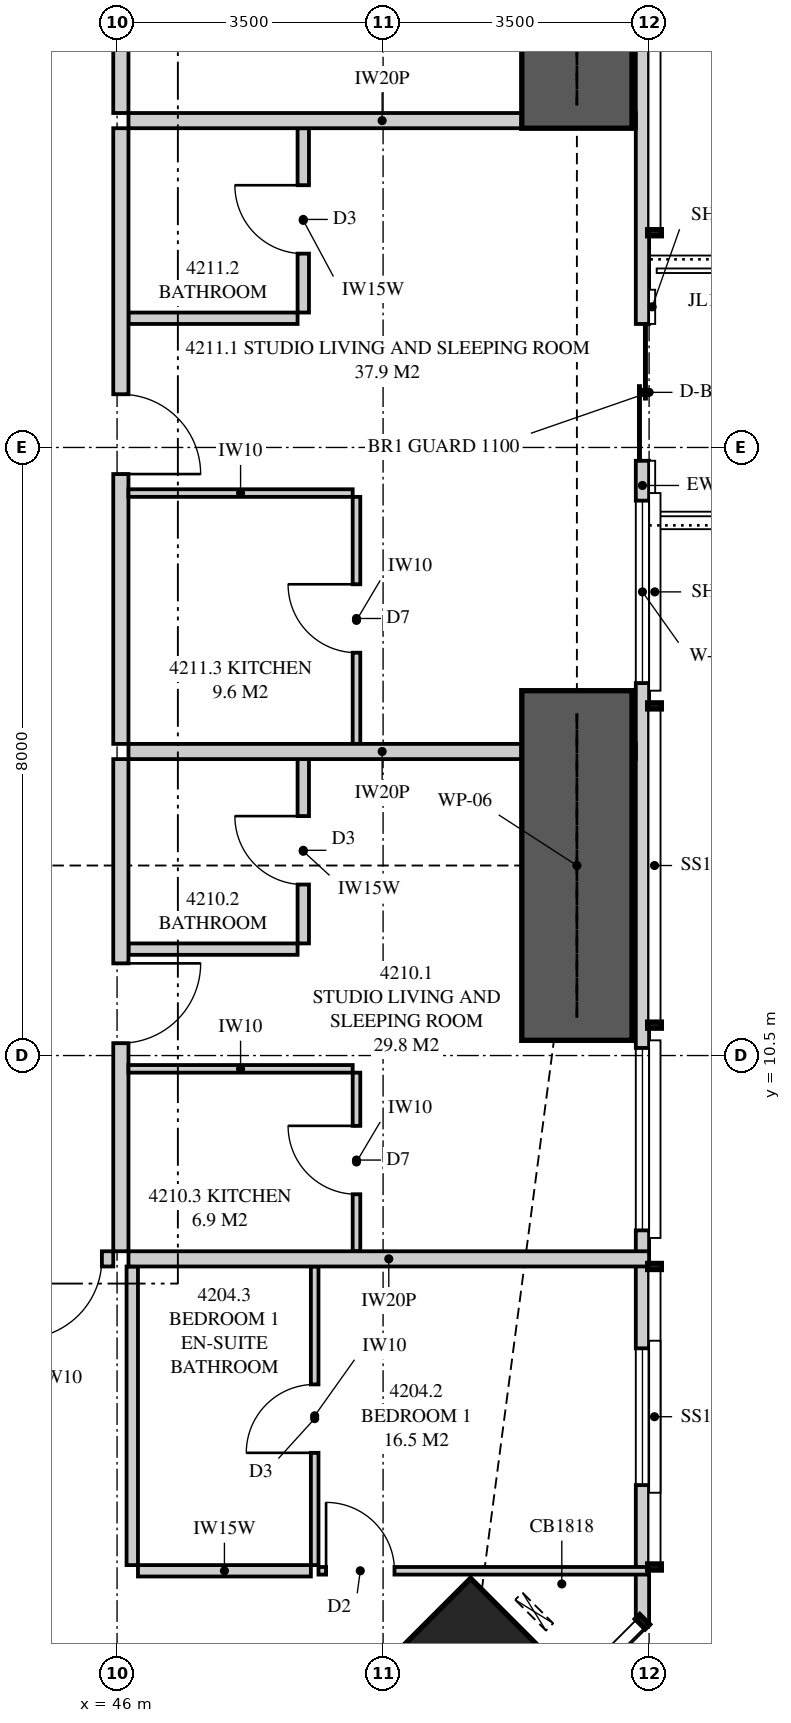
"""IFC4 building model, lengths in metres.
Left out: names, types, materials, properties, quantities, classifications, styles, units other than length and angle.
Written with IfcOpenShell. Run it as: python <this file> out.ifc"""

import sys

from ifc_helpers import new_model, si_unit, direction, frame, frame_2d, origin, origin_2d, place, context, subcontext, project, spatial, polyline, rectangle, hollow_rectangle, outline, extrude, element, fill, save


model = new_model("IFC4")
c1 = context("Model", 3, precision=1e-05, world=origin(), true_north=direction((0.0, 1.0)))
c2 = subcontext(c1, "Body", "Model", "MODEL_VIEW")
j1 = project(units=[si_unit("LENGTHUNIT", "METRE"), si_unit("PLANEANGLEUNIT", "RADIAN")], contexts=[c1])
p1 = place(None, origin())
s1 = spatial("IfcSite", under=j1, at=p1, CompositionType="ELEMENT")
p2 = place(p1, origin())
s2 = spatial("IfcBuilding", under=s1, at=p2, CompositionType="ELEMENT")
p3 = place(p2, frame((0.0, 0.0, 157.7)))
s3 = spatial("IfcBuildingStorey", under=s2, at=p3, CompositionType="ELEMENT", Elevation=157.7)
p4 = place(p3, frame((50.652, 2.348, 0.0), z_axis=(0.0, 0.0, 1.0), x_axis=(-0.707106781187, 0.707106781187, 0.0)))
e1 = element("IfcColumn", 1, at=p4, inside=s3, PredefinedType="COLUMN", context=c2, shape_type="SweptSolid", body=[
    extrude(hollow_rectangle(XDim=1.8, YDim=1.8, WallThickness=0.125, at=origin_2d()), origin(), (0.0, 0.0, 1.0), 3.35),
])
p5 = place(p3, frame((52.913, 3.051, 0.0), z_axis=(0.0, 0.0, 1.0), x_axis=(0.0, 1.0, 0.0)))
e2 = element("IfcWall", 2, at=p5, inside=s3, PredefinedType="SOLIDWALL", context=c2, shape_type="SweptSolid", body=[
    extrude(outline(polyline([(0.0, 0.0), (29.897, 0.0), (29.897, 3.11), (22.167, 3.11), (22.167, 2.15), (22.074, 2.15), (22.074, 3.11), (21.949, 3.11), (21.949, 2.15), (9.949, 2.15), (9.949, 3.11), (9.847, 3.11), (9.847, 2.15), (9.706, 2.15), (9.706, 3.11), (0.0, 3.11), (0.0, 0.0)])), frame((0.0, 0.087, 0.0), z_axis=(0.0, -1.0, 0.0), x_axis=(1.0, 0.0, 0.0)), (0.0, 0.0, 1.0), 0.175),
])
p6 = place(p5, frame((1.797, 0.0, 0.4)))
e3 = element("IfcOpeningElement", 3, at=p6, cuts=e2, PredefinedType="OPENING", context=c2, shape_type="SweptSolid", body=[
    extrude(rectangle(XDim=1.8, YDim=1.7, at=frame_2d((0.9, 0.85))), frame((0.0, 0.097, 0.0), z_axis=(0.0, -1.0, 0.0), x_axis=(1.0, 0.0, 0.0)), (0.0, 0.0, 1.0), 0.195),
])
p7 = place(p5, frame((5.149, 0.0, 0.4)))
e4 = element("IfcOpeningElement", 4, at=p7, cuts=e2, PredefinedType="OPENING", context=c2, shape_type="SweptSolid", body=[
    extrude(rectangle(XDim=2.4, YDim=1.7, at=frame_2d((1.2, 0.85))), frame((0.0, 0.097, 0.0), z_axis=(0.0, -1.0, 0.0), x_axis=(1.0, 0.0, 0.0)), (0.0, 0.0, 1.0), 0.195),
])
p8 = place(p5, frame((15.274, 0.0, 0.0)))
e5 = element("IfcOpeningElement", 5, at=p8, cuts=e2, PredefinedType="OPENING", context=c2, shape_type="SweptSolid", body=[
    extrude(rectangle(XDim=1.8, YDim=2.1, at=frame_2d((0.9, 1.05))), frame((0.0, 0.097, 0.0), z_axis=(0.0, -1.0, 0.0), x_axis=(1.0, 0.0, 0.0)), (0.0, 0.0, 1.0), 0.195),
])
p9 = place(p5, frame((12.349, 0.0, 0.4)))
e6 = element("IfcOpeningElement", 6, at=p9, cuts=e2, PredefinedType="OPENING", context=c2, shape_type="SweptSolid", body=[
    extrude(rectangle(XDim=2.4, YDim=1.7, at=frame_2d((1.2, 0.85))), frame((0.0, 0.097, 0.0), z_axis=(0.0, -1.0, 0.0), x_axis=(1.0, 0.0, 0.0)), (0.0, 0.0, 1.0), 0.195),
])
p10 = place(p5, frame((24.373, 0.0, 0.4)))
e7 = element("IfcOpeningElement", 7, at=p10, cuts=e2, PredefinedType="OPENING", context=c2, shape_type="SweptSolid", body=[
    extrude(rectangle(XDim=1.2, YDim=1.7, at=frame_2d((0.6, 0.85))), frame((0.0, 0.097, 0.0), z_axis=(0.0, -1.0, 0.0), x_axis=(1.0, 0.0, 0.0)), (0.0, 0.0, 1.0), 0.195),
])
p11 = place(p5, frame((26.801, 0.0, 0.4)))
e8 = element("IfcOpeningElement", 8, at=p11, cuts=e2, PredefinedType="OPENING", context=c2, shape_type="SweptSolid", body=[
    extrude(rectangle(XDim=1.8, YDim=1.7, at=frame_2d((0.9, 0.85))), frame((0.0, 0.097, 0.0), z_axis=(0.0, -1.0, 0.0), x_axis=(1.0, 0.0, 0.0)), (0.0, 0.0, 1.0), 0.195),
])
p12 = place(p3, frame((41.2, 7.825, 0.0), z_axis=(0.0, 0.0, 1.0), x_axis=(1.0, 0.0, 0.0)))
e9 = element("IfcWall", 9, at=p12, inside=s3, PredefinedType="PARTITIONING", context=c2, shape_type="SweptSolid", body=[
    extrude(outline(polyline([(0.0, 0.0), (4.75, 0.0), (4.75, 3.11), (1.896, 3.11), (1.896, 2.531), (1.204, 2.531), (1.204, 3.11), (0.0, 3.11), (0.0, 0.0)])), frame((0.0, 0.1, 0.0), z_axis=(0.0, -1.0, 0.0), x_axis=(1.0, 0.0, 0.0)), (0.0, 0.0, 1.0), 0.2),
])
p13 = place(p12, frame((3.55, 0.0, 0.0)))
e10 = element("IfcOpeningElement", 10, at=p13, cuts=e9, PredefinedType="OPENING", context=c2, shape_type="SweptSolid", body=[
    extrude(rectangle(XDim=1.05, YDim=2.2, at=frame_2d((0.525, 1.1))), frame((0.0, 0.11, 0.0), z_axis=(0.0, -1.0, 0.0), x_axis=(1.0, 0.0, 0.0)), (0.0, 0.0, 1.0), 0.22),
])
p14 = place(p3, frame((48.6, 3.796, 0.0), z_axis=(0.0, 0.0, 1.0), x_axis=(0.0, 1.0, 0.0)))
e11 = element("IfcWall", 11, at=p14, inside=s3, PredefinedType="PARTITIONING", context=c2, shape_type="SweptSolid", body=[
    extrude(rectangle(XDim=3.929, YDim=0.1, at=frame_2d((1.964, 0.0))), origin(), (0.0, 0.0, 1.0), 3.11),
])
p15 = place(p14, frame((1.477, 0.0, 0.0)))
e12 = element("IfcOpeningElement", 12, at=p15, cuts=e11, PredefinedType="OPENING", context=c2, shape_type="SweptSolid", body=[
    extrude(rectangle(XDim=0.9, YDim=2.1, at=frame_2d((0.45, 1.05))), frame((0.0, 0.06, 0.0), z_axis=(0.0, -1.0, 0.0), x_axis=(1.0, 0.0, 0.0)), (0.0, 0.0, 1.0), 0.12),
])
p16 = place(p3, frame((48.65, 3.721, 0.0), z_axis=(0.0, 0.0, 1.0), x_axis=(1.0, 0.0, 0.0)))
e13 = element("IfcWall", 13, at=p16, inside=s3, PredefinedType="PARTITIONING", context=c2, shape_type="SweptSolid", body=[
    extrude(outline(polyline([(0.0, 0.0), (4.35, 0.0), (4.35, 3.11), (3.049, 3.11), (3.049, 2.15), (1.314, 2.15), (1.314, 3.11), (0.0, 3.11), (0.0, 0.0)])), frame((0.0, 0.05, 0.0), z_axis=(0.0, -1.0, 0.0), x_axis=(1.0, 0.0, 0.0)), (0.0, 0.0, 1.0), 0.1),
])
p17 = place(p16, frame((0.1, 0.0, 0.0)))
e14 = element("IfcOpeningElement", 14, at=p17, cuts=e13, PredefinedType="OPENING", context=c2, shape_type="SweptSolid", body=[
    extrude(rectangle(XDim=0.9, YDim=2.1, at=frame_2d((0.45, 1.05))), frame((0.0, 0.06, 0.0), z_axis=(0.0, -1.0, 0.0), x_axis=(1.0, 0.0, 0.0)), (0.0, 0.0, 1.0), 0.12),
])
p18 = place(p3, frame((46.275, 3.721, 0.0), z_axis=(0.0, 0.0, 1.0), x_axis=(1.0, 0.0, 0.0)))
e15 = element("IfcWall", 15, at=p18, inside=s3, PredefinedType="PLUMBINGWALL", context=c2, shape_type="SweptSolid", body=[
    extrude(rectangle(XDim=2.275, YDim=0.15, at=frame_2d((1.138, 0.0))), origin(), (0.0, 0.0, 1.0), 3.11),
])
p19 = place(p3, frame((46.2, 3.796, 0.0), z_axis=(0.0, 0.0, 1.0), x_axis=(0.0, 1.0, 0.0)))
e16 = element("IfcWall", 16, at=p19, inside=s3, PredefinedType="PLUMBINGWALL", context=c2, shape_type="SweptSolid", body=[
    extrude(rectangle(XDim=3.929, YDim=0.15, at=frame_2d((1.964, 0.0))), origin(), (0.0, 0.0, 1.0), 3.11),
])
p20 = place(p3, frame((46.15, 7.825, 0.0), z_axis=(0.0, 0.0, 1.0), x_axis=(1.0, 0.0, 0.0)))
e17 = element("IfcWall", 17, at=p20, inside=s3, PredefinedType="PARTITIONING", context=c2, shape_type="SweptSolid", body=[
    extrude(outline(polyline([(0.0, 0.0), (6.85, 0.0), (6.85, 3.11), (6.138, 3.11), (6.138, 2.15), (4.303, 2.15), (4.303, 3.11), (0.0, 3.11), (0.0, 0.0)])), frame((0.0, 0.1, 0.0), z_axis=(0.0, -1.0, 0.0), x_axis=(1.0, 0.0, 0.0)), (0.0, 0.0, 1.0), 0.2),
])
p21 = place(p3, frame((52.825, 14.5, 0.0), z_axis=(0.0, 0.0, 1.0), x_axis=(-1.0, 0.0, 0.0)))
e18 = element("IfcWall", 18, at=p21, inside=s3, PredefinedType="PARTITIONING", context=c2, shape_type="SweptSolid", body=[
    extrude(outline(polyline([(0.529, 2.15), (0.0, 2.15), (0.0, 0.0), (0.529, 0.0), (0.529, 0.29), (1.021, 0.29), (1.021, 0.0), (6.675, 0.0), (6.675, 3.11), (1.685, 3.11), (1.685, 2.15), (1.021, 2.15), (1.021, 1.86), (0.529, 1.86), (0.529, 2.15)])), frame((0.0, 0.1, 0.0), z_axis=(0.0, -1.0, 0.0), x_axis=(1.0, 0.0, 0.0)), (0.0, 0.0, 1.0), 0.2),
])
p22 = place(p3, frame((46.05, 7.925, 0.0), z_axis=(0.0, 0.0, 1.0), x_axis=(0.0, 1.0, 0.0)))
e19 = element("IfcWall", 19, at=p22, inside=s3, PredefinedType="PARTITIONING", context=c2, shape_type="SweptSolid", body=[
    extrude(outline(polyline([(0.0, 0.0), (6.475, 0.0), (6.475, 3.11), (5.421, 3.11), (5.421, 2.531), (4.729, 2.531), (4.729, 3.11), (0.0, 3.11), (0.0, 0.0)])), frame((0.0, 0.1, 0.0), z_axis=(0.0, -1.0, 0.0), x_axis=(1.0, 0.0, 0.0)), (0.0, 0.0, 1.0), 0.2),
])
p23 = place(p22, frame((2.738, 0.0, 0.0)))
e20 = element("IfcOpeningElement", 20, at=p23, cuts=e19, PredefinedType="OPENING", context=c2, shape_type="SweptSolid", body=[
    extrude(rectangle(XDim=1.05, YDim=2.2, at=frame_2d((0.525, 1.1))), frame((0.0, 0.11, 0.0), z_axis=(0.0, -1.0, 0.0), x_axis=(1.0, 0.0, 0.0)), (0.0, 0.0, 1.0), 0.22),
])
p24 = place(p3, frame((48.45, 11.975, 0.0), z_axis=(0.0, 0.0, 1.0), x_axis=(0.0, 1.0, 0.0)))
e21 = element("IfcWall", 21, at=p24, inside=s3, PredefinedType="PLUMBINGWALL", context=c2, shape_type="SweptSolid", body=[
    extrude(outline(polyline([(0.0, 0.0), (2.425, 0.0), (2.425, 3.11), (1.346, 3.11), (1.346, 2.531), (0.704, 2.531), (0.704, 3.11), (0.0, 3.11), (0.0, 0.0)])), frame((0.0, 0.075, 0.0), z_axis=(0.0, -1.0, 0.0), x_axis=(1.0, 0.0, 0.0)), (0.0, 0.0, 1.0), 0.15),
])
p25 = place(p24, frame((0.775, 0.0, 0.0)))
e22 = element("IfcOpeningElement", 22, at=p25, cuts=e21, PredefinedType="OPENING", context=c2, shape_type="SweptSolid", body=[
    extrude(rectangle(XDim=0.9, YDim=2.1, at=frame_2d((0.45, 1.05))), frame((0.0, 0.085, 0.0), z_axis=(0.0, -1.0, 0.0), x_axis=(1.0, 0.0, 0.0)), (0.0, 0.0, 1.0), 0.17),
])
p26 = place(p3, frame((48.375, 11.9, 0.0), z_axis=(0.0, 0.0, 1.0), x_axis=(-1.0, 0.0, 0.0)))
e23 = element("IfcWall", 23, at=p26, inside=s3, PredefinedType="PLUMBINGWALL", context=c2, shape_type="SweptSolid", body=[
    extrude(rectangle(XDim=2.225, YDim=0.15, at=frame_2d((1.113, 0.0))), origin(), (0.0, 0.0, 1.0), 3.11),
])
p27 = place(p3, frame((49.15, 7.925, 0.0), z_axis=(0.0, 0.0, 1.0), x_axis=(0.0, 1.0, 0.0)))
e24 = element("IfcWall", 24, at=p27, inside=s3, PredefinedType="PARTITIONING", context=c2, shape_type="SweptSolid", body=[
    extrude(rectangle(XDim=2.35, YDim=0.1, at=frame_2d((1.175, 0.0))), origin(), (0.0, 0.0, 1.0), 3.11),
])
p28 = place(p27, frame((0.75, 0.0, 0.0)))
e25 = element("IfcOpeningElement", 25, at=p28, cuts=e24, PredefinedType="OPENING", context=c2, shape_type="SweptSolid", body=[
    extrude(rectangle(XDim=0.9, YDim=2.1, at=frame_2d((0.45, 1.05))), frame((0.0, 0.06, 0.0), z_axis=(0.0, -1.0, 0.0), x_axis=(1.0, 0.0, 0.0)), (0.0, 0.0, 1.0), 0.12),
])
p29 = place(p3, frame((49.1, 10.325, 0.0), z_axis=(0.0, 0.0, 1.0), x_axis=(-1.0, 0.0, 0.0)))
e26 = element("IfcWall", 26, at=p29, inside=s3, PredefinedType="PARTITIONING", context=c2, shape_type="SweptSolid", body=[
    extrude(rectangle(XDim=2.95, YDim=0.1, at=frame_2d((1.475, 0.0))), origin(), (0.0, 0.0, 1.0), 3.11),
])
p30 = place(p3, frame((52.825, 22.8, 0.0), z_axis=(0.0, 0.0, 1.0), x_axis=(-1.0, 0.0, 0.0)))
e27 = element("IfcWall", 27, at=p30, inside=s3, PredefinedType="PARTITIONING", context=c2, shape_type="SweptSolid", body=[
    extrude(outline(polyline([(0.0, 0.0), (6.675, 0.0), (6.675, 3.11), (1.685, 3.11), (1.685, 2.15), (0.0, 2.15), (0.0, 3.11), (0.0, 0.0)])), frame((0.0, 0.1, 0.0), z_axis=(0.0, -1.0, 0.0), x_axis=(1.0, 0.0, 0.0)), (0.0, 0.0, 1.0), 0.2),
])
p31 = place(p3, frame((46.05, 14.6, 0.0), z_axis=(0.0, 0.0, 1.0), x_axis=(0.0, 1.0, 0.0)))
e28 = element("IfcWall", 28, at=p31, inside=s3, PredefinedType="PARTITIONING", context=c2, shape_type="SweptSolid", body=[
    extrude(rectangle(XDim=8.1, YDim=0.2, at=frame_2d((4.05, 0.0))), origin(), (0.0, 0.0, 1.0), 3.11),
])
p32 = place(p31, frame((3.55, 0.0, 0.0)))
e29 = element("IfcOpeningElement", 29, at=p32, cuts=e28, PredefinedType="OPENING", context=c2, shape_type="SweptSolid", body=[
    extrude(rectangle(XDim=1.05, YDim=2.2, at=frame_2d((0.525, 1.1))), frame((0.0, 0.11, 0.0), z_axis=(0.0, -1.0, 0.0), x_axis=(1.0, 0.0, 0.0)), (0.0, 0.0, 1.0), 0.22),
])
p33 = place(p3, frame((48.45, 20.275, 0.0), z_axis=(0.0, 0.0, 1.0), x_axis=(0.0, 1.0, 0.0)))
e30 = element("IfcWall", 30, at=p33, inside=s3, PredefinedType="PLUMBINGWALL", context=c2, shape_type="SweptSolid", body=[
    extrude(rectangle(XDim=2.425, YDim=0.15, at=frame_2d((1.212, 0.0))), origin(), (0.0, 0.0, 1.0), 3.11),
])
p34 = place(p33, frame((0.775, 0.0, 0.0)))
e31 = element("IfcOpeningElement", 31, at=p34, cuts=e30, PredefinedType="OPENING", context=c2, shape_type="SweptSolid", body=[
    extrude(rectangle(XDim=0.9, YDim=2.1, at=frame_2d((0.45, 1.05))), frame((0.0, 0.085, 0.0), z_axis=(0.0, -1.0, 0.0), x_axis=(1.0, 0.0, 0.0)), (0.0, 0.0, 1.0), 0.17),
])
p35 = place(p3, frame((48.375, 20.2, 0.0), z_axis=(0.0, 0.0, 1.0), x_axis=(-1.0, 0.0, 0.0)))
e32 = element("IfcWall", 32, at=p35, inside=s3, PredefinedType="PLUMBINGWALL", context=c2, shape_type="SweptSolid", body=[
    extrude(rectangle(XDim=2.225, YDim=0.15, at=frame_2d((1.113, 0.0))), origin(), (0.0, 0.0, 1.0), 3.11),
])
p36 = place(p3, frame((49.15, 14.6, 0.0), z_axis=(0.0, 0.0, 1.0), x_axis=(0.0, 1.0, 0.0)))
e33 = element("IfcWall", 33, at=p36, inside=s3, PredefinedType="PARTITIONING", context=c2, shape_type="SweptSolid", body=[
    extrude(rectangle(XDim=3.25, YDim=0.1, at=frame_2d((1.625, 0.0))), origin(), (0.0, 0.0, 1.0), 3.11),
])
p37 = place(p36, frame((1.2, 0.0, 0.0)))
e34 = element("IfcOpeningElement", 34, at=p37, cuts=e33, PredefinedType="OPENING", context=c2, shape_type="SweptSolid", body=[
    extrude(rectangle(XDim=0.9, YDim=2.1, at=frame_2d((0.45, 1.05))), frame((0.0, 0.06, 0.0), z_axis=(0.0, -1.0, 0.0), x_axis=(1.0, 0.0, 0.0)), (0.0, 0.0, 1.0), 0.12),
])
p38 = place(p3, frame((49.1, 17.9, 0.0), z_axis=(0.0, 0.0, 1.0), x_axis=(-1.0, 0.0, 0.0)))
e35 = element("IfcWall", 35, at=p38, inside=s3, PredefinedType="PARTITIONING", context=c2, shape_type="SweptSolid", body=[
    extrude(rectangle(XDim=2.95, YDim=0.1, at=frame_2d((1.475, 0.0))), origin(), (0.0, 0.0, 1.0), 3.11),
])
p39 = place(p3, frame((46.05, 22.9, 0.0), z_axis=(0.0, 0.0, 1.0), x_axis=(0.0, 1.0, 0.0)))
e36 = element("IfcWall", 36, at=p39, inside=s3, PredefinedType="PARTITIONING", context=c2, shape_type="SweptSolid", body=[
    extrude(outline(polyline([(0.0, 0.0), (6.175, 0.0), (6.175, 3.11), (2.446, 3.11), (2.446, 2.531), (1.754, 2.531), (1.754, 3.11), (0.0, 3.11), (0.0, 0.0)])), frame((0.0, 0.1, 0.0), z_axis=(0.0, -1.0, 0.0), x_axis=(1.0, 0.0, 0.0)), (0.0, 0.0, 1.0), 0.2),
])
p40 = place(p39, frame((2.587, 0.0, 0.0)))
e37 = element("IfcOpeningElement", 37, at=p40, cuts=e36, PredefinedType="OPENING", context=c2, shape_type="SweptSolid", body=[
    extrude(rectangle(XDim=1.05, YDim=2.2, at=frame_2d((0.525, 1.1))), frame((0.0, 0.11, 0.0), z_axis=(0.0, -1.0, 0.0), x_axis=(1.0, 0.0, 0.0)), (0.0, 0.0, 1.0), 0.22),
])
for number, where, z_axis, x_axis in (
    (38, (52.05, 10.7, 0.0), (0.0, 0.0, 1.0), (0.0, 1.0, 0.0)),
    (39, (52.05, 22.7, 0.0), (0.0, 0.0, 1.0), (0.0, 1.0, 0.0)),
):
    element("IfcWall", number, at=place(p3, frame(where, z_axis=z_axis, x_axis=x_axis)), inside=s3, PredefinedType="SHEAR", context=c2, shape_type="SweptSolid", body=[
        extrude(rectangle(XDim=4.6, YDim=1.45, at=frame_2d((2.3, 0.0))), origin(), (0.0, 0.0, 1.0), 3.35),
    ])
p41 = place(p6, origin())
e40 = element("IfcWindow", 40, at=p41, inside=s3, PartitioningType="SINGLE_PANEL", PredefinedType="WINDOW", context=c2, shape_type="SweptSolid", body=[
    extrude(rectangle(XDim=1.8, YDim=1.7, at=frame_2d((0.9, 0.85))), frame((0.0, 0.03, 0.0), z_axis=(0.0, -1.0, 0.0), x_axis=(1.0, 0.0, 0.0)), (0.0, 0.0, 1.0), 0.06),
])
fill(e3, e40)
p42 = place(p7, origin())
e41 = element("IfcWindow", 41, at=p42, inside=s3, PartitioningType="SINGLE_PANEL", PredefinedType="WINDOW", context=c2, shape_type="SweptSolid", body=[
    extrude(rectangle(XDim=2.4, YDim=1.7, at=frame_2d((1.2, 0.85))), frame((0.0, 0.03, 0.0), z_axis=(0.0, -1.0, 0.0), x_axis=(1.0, 0.0, 0.0)), (0.0, 0.0, 1.0), 0.06),
])
fill(e4, e41)
p43 = place(p8, origin())
e42 = element("IfcDoor", 42, at=p43, inside=s3, OperationType="SLIDING_TO_LEFT", PredefinedType="DOOR", context=c2, shape_type="SweptSolid", body=[
    extrude(rectangle(XDim=1.8, YDim=2.1, at=frame_2d((0.9, 1.05))), frame((0.0, 0.025, 0.0), z_axis=(0.0, -1.0, 0.0), x_axis=(1.0, 0.0, 0.0)), (0.0, 0.0, 1.0), 0.05),
])
fill(e5, e42)
p44 = place(p9, origin())
e43 = element("IfcWindow", 43, at=p44, inside=s3, PartitioningType="SINGLE_PANEL", PredefinedType="WINDOW", context=c2, shape_type="SweptSolid", body=[
    extrude(rectangle(XDim=2.4, YDim=1.7, at=frame_2d((1.2, 0.85))), frame((0.0, 0.03, 0.0), z_axis=(0.0, -1.0, 0.0), x_axis=(1.0, 0.0, 0.0)), (0.0, 0.0, 1.0), 0.06),
])
fill(e6, e43)
p45 = place(p13, frame((1.05, 0.0, 0.0), z_axis=(0.0, 0.0, 1.0), x_axis=(-1.0, 0.0, 0.0)))
e44 = element("IfcDoor", 44, at=p45, inside=s3, OperationType="SINGLE_SWING_RIGHT", PredefinedType="DOOR", context=c2, shape_type="SweptSolid", body=[
    extrude(rectangle(XDim=1.05, YDim=2.2, at=frame_2d((0.525, 1.1))), frame((0.0, 0.025, 0.0), z_axis=(0.0, -1.0, 0.0), x_axis=(1.0, 0.0, 0.0)), (0.0, 0.0, 1.0), 0.05),
])
fill(e10, e44)
p46 = place(p17, origin())
e45 = element("IfcDoor", 45, at=p46, inside=s3, OperationType="SINGLE_SWING_LEFT", PredefinedType="DOOR", context=c2, shape_type="SweptSolid", body=[
    extrude(rectangle(XDim=0.9, YDim=2.1, at=frame_2d((0.45, 1.05))), frame((0.0, 0.025, 0.0), z_axis=(0.0, -1.0, 0.0), x_axis=(1.0, 0.0, 0.0)), (0.0, 0.0, 1.0), 0.05),
])
fill(e14, e45)
p47 = place(p15, origin())
e46 = element("IfcDoor", 46, at=p47, inside=s3, OperationType="SINGLE_SWING_LEFT", PredefinedType="DOOR", context=c2, shape_type="SweptSolid", body=[
    extrude(rectangle(XDim=0.9, YDim=2.1, at=frame_2d((0.45, 1.05))), frame((0.0, 0.025, 0.0), z_axis=(0.0, -1.0, 0.0), x_axis=(1.0, 0.0, 0.0)), (0.0, 0.0, 1.0), 0.05),
])
fill(e12, e46)
p48 = place(p23, frame((1.05, 0.0, 0.0), z_axis=(0.0, 0.0, 1.0), x_axis=(-1.0, 0.0, 0.0)))
e47 = element("IfcDoor", 47, at=p48, inside=s3, OperationType="SINGLE_SWING_LEFT", PredefinedType="DOOR", context=c2, shape_type="SweptSolid", body=[
    extrude(rectangle(XDim=1.05, YDim=2.2, at=frame_2d((0.525, 1.1))), frame((0.0, 0.025, 0.0), z_axis=(0.0, -1.0, 0.0), x_axis=(1.0, 0.0, 0.0)), (0.0, 0.0, 1.0), 0.05),
])
fill(e20, e47)
p49 = place(p25, origin())
e48 = element("IfcDoor", 48, at=p49, inside=s3, OperationType="SINGLE_SWING_RIGHT", PredefinedType="DOOR", context=c2, shape_type="SweptSolid", body=[
    extrude(rectangle(XDim=0.9, YDim=2.1, at=frame_2d((0.45, 1.05))), frame((0.0, 0.025, 0.0), z_axis=(0.0, -1.0, 0.0), x_axis=(1.0, 0.0, 0.0)), (0.0, 0.0, 1.0), 0.05),
])
fill(e22, e48)
p50 = place(p28, origin())
e49 = element("IfcDoor", 49, at=p50, inside=s3, OperationType="SINGLE_SWING_RIGHT", PredefinedType="DOOR", context=c2, shape_type="SweptSolid", body=[
    extrude(rectangle(XDim=0.9, YDim=2.1, at=frame_2d((0.45, 1.05))), frame((0.0, 0.025, 0.0), z_axis=(0.0, -1.0, 0.0), x_axis=(1.0, 0.0, 0.0)), (0.0, 0.0, 1.0), 0.05),
])
fill(e25, e49)
p51 = place(p32, frame((1.05, 0.0, 0.0), z_axis=(0.0, 0.0, 1.0), x_axis=(-1.0, 0.0, 0.0)))
e50 = element("IfcDoor", 50, at=p51, inside=s3, OperationType="SINGLE_SWING_RIGHT", PredefinedType="DOOR", context=c2, shape_type="SweptSolid", body=[
    extrude(rectangle(XDim=1.05, YDim=2.2, at=frame_2d((0.525, 1.1))), frame((0.0, 0.025, 0.0), z_axis=(0.0, -1.0, 0.0), x_axis=(1.0, 0.0, 0.0)), (0.0, 0.0, 1.0), 0.05),
])
fill(e29, e50)
p52 = place(p34, origin())
e51 = element("IfcDoor", 51, at=p52, inside=s3, OperationType="SINGLE_SWING_RIGHT", PredefinedType="DOOR", context=c2, shape_type="SweptSolid", body=[
    extrude(rectangle(XDim=0.9, YDim=2.1, at=frame_2d((0.45, 1.05))), frame((0.0, 0.025, 0.0), z_axis=(0.0, -1.0, 0.0), x_axis=(1.0, 0.0, 0.0)), (0.0, 0.0, 1.0), 0.05),
])
fill(e31, e51)
p53 = place(p37, origin())
e52 = element("IfcDoor", 52, at=p53, inside=s3, OperationType="SINGLE_SWING_RIGHT", PredefinedType="DOOR", context=c2, shape_type="SweptSolid", body=[
    extrude(rectangle(XDim=0.9, YDim=2.1, at=frame_2d((0.45, 1.05))), frame((0.0, 0.025, 0.0), z_axis=(0.0, -1.0, 0.0), x_axis=(1.0, 0.0, 0.0)), (0.0, 0.0, 1.0), 0.05),
])
fill(e34, e52)
save(model, sys.argv[1])
